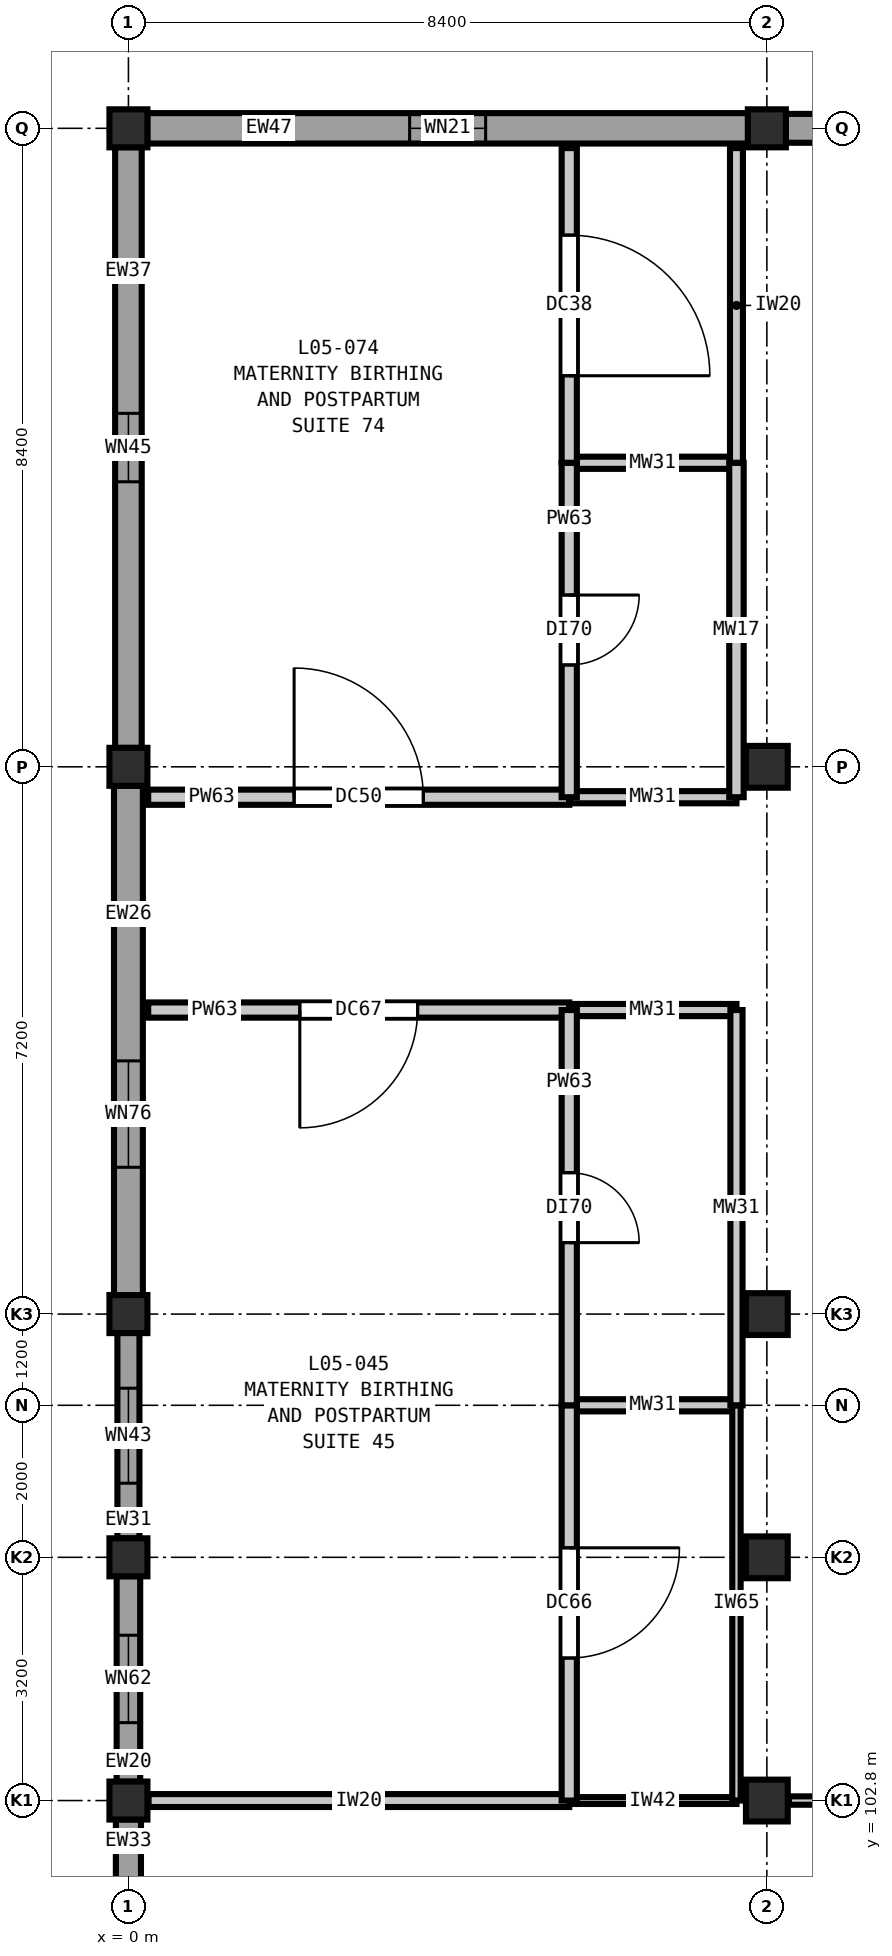
"""IFC4 building model, lengths in metres.
Left out: names, types, materials, properties, quantities, classifications, styles, units other than length and angle.
Written with IfcOpenShell. Run it as: python <this file> out.ifc"""

import sys

from ifc_helpers import new_model, si_unit, direction, frame, frame_2d, origin, origin_2d, place, context, subcontext, project, spatial, rectangle, extrude, element, fill, save


model = new_model("IFC4")
c1 = context("Model", 3, precision=1e-05, world=origin(), true_north=direction((0.0, 1.0)))
c2 = subcontext(c1, "Body", "Model", "MODEL_VIEW")
j1 = project(units=[si_unit("LENGTHUNIT", "METRE"), si_unit("PLANEANGLEUNIT", "RADIAN")], contexts=[c1])
p1 = place(None, origin())
s1 = spatial("IfcSite", under=j1, at=p1, CompositionType="ELEMENT")
p2 = place(p1, origin())
s2 = spatial("IfcBuilding", under=s1, at=p2, CompositionType="ELEMENT")
p3 = place(p2, frame((0.0, 0.0, 24.6)))
s3 = spatial("IfcBuildingStorey", under=s2, at=p3, CompositionType="ELEMENT", Elevation=24.6)
for number, where, z_axis, x_axis in (
    (1, (0.0, 102.8, 0.0), (0.0, 0.0, 1.0), (1.0, 0.0, 0.0)),
    (2, (0.0, 106.0, 0.0), (0.0, 0.0, 1.0), (1.0, 0.0, 0.0)),
    (3, (0.0, 109.2, 0.0), (0.0, 0.0, 1.0), (1.0, 0.0, 0.0)),
    (4, (0.0, 116.4, 0.0), (0.0, 0.0, 1.0), (1.0, 0.0, 0.0)),
    (5, (0.0, 124.8, 0.0), (0.0, 0.0, 1.0), (1.0, 0.0, 0.0)),
):
    element("IfcColumn", number, at=place(p3, frame(where, z_axis=z_axis, x_axis=x_axis)), inside=s3, PredefinedType="COLUMN", context=c2, shape_type="SweptSolid", body=[
        extrude(rectangle(XDim=0.5, YDim=0.5, at=origin_2d()), origin(), (0.0, 0.0, 1.0), 4.2),
    ])
for number, where, z_axis, x_axis in (
    (6, (8.4, 102.8, 0.0), (0.0, 0.0, 1.0), (1.0, 0.0, 0.0)),
    (7, (8.4, 106.0, 0.0), (0.0, 0.0, 1.0), (1.0, 0.0, 0.0)),
    (8, (8.4, 109.2, 0.0), (0.0, 0.0, 1.0), (1.0, 0.0, 0.0)),
    (9, (8.4, 116.4, 0.0), (0.0, 0.0, 1.0), (1.0, 0.0, 0.0)),
):
    element("IfcColumn", number, at=place(p3, frame(where, z_axis=z_axis, x_axis=x_axis)), inside=s3, PredefinedType="COLUMN", context=c2, shape_type="SweptSolid", body=[
        extrude(rectangle(XDim=0.55, YDim=0.55, at=origin_2d()), origin(), (0.0, 0.0, 1.0), 4.2),
    ])
p4 = place(p3, frame((8.4, 124.8, 0.0), z_axis=(0.0, 0.0, 1.0), x_axis=(1.0, 0.0, 0.0)))
e10 = element("IfcColumn", 10, at=p4, inside=s3, PredefinedType="COLUMN", context=c2, shape_type="SweptSolid", body=[
    extrude(rectangle(XDim=0.5, YDim=0.5, at=origin_2d()), origin(), (0.0, 0.0, 1.0), 4.2),
])
p5 = place(p3, frame((0.0, 99.848, 0.0), z_axis=(0.0, 0.0, 1.0), x_axis=(0.0, 1.0, 0.0)))
e11 = element("IfcWall", 11, at=p5, inside=s3, PredefinedType="SOLIDWALL", context=c2, shape_type="SweptSolid", body=[
    extrude(rectangle(XDim=2.704, YDim=0.33, at=frame_2d((1.352, 0.0))), origin(), (0.0, 0.0, 1.0), 3.48),
])
p6 = place(p5, frame((0.827, 0.0, 0.9)))
e12 = element("IfcOpeningElement", 12, at=p6, cuts=e11, PredefinedType="OPENING", context=c2, shape_type="SweptSolid", body=[
    extrude(rectangle(XDim=1.05, YDim=1.4, at=frame_2d((0.525, 0.7))), frame((0.0, 0.175, 0.0), z_axis=(0.0, -1.0, 0.0), x_axis=(1.0, 0.0, 0.0)), (0.0, 0.0, 1.0), 0.35),
])
p7 = place(p3, frame((0.0, 103.048, 0.0), z_axis=(0.0, 0.0, 1.0), x_axis=(0.0, 1.0, 0.0)))
e13 = element("IfcWall", 13, at=p7, inside=s3, PredefinedType="SOLIDWALL", context=c2, shape_type="SweptSolid", body=[
    extrude(rectangle(XDim=2.704, YDim=0.31, at=frame_2d((1.352, 0.0))), origin(), (0.0, 0.0, 1.0), 3.48),
])
p8 = place(p7, frame((0.777, 0.0, 0.9)))
e14 = element("IfcOpeningElement", 14, at=p8, cuts=e13, PredefinedType="OPENING", context=c2, shape_type="SweptSolid", body=[
    extrude(rectangle(XDim=1.15, YDim=1.4, at=frame_2d((0.575, 0.7))), frame((0.0, 0.165, 0.0), z_axis=(0.0, -1.0, 0.0), x_axis=(1.0, 0.0, 0.0)), (0.0, 0.0, 1.0), 0.33),
])
p9 = place(p3, frame((0.0, 106.248, 0.0), z_axis=(0.0, 0.0, 1.0), x_axis=(0.0, 1.0, 0.0)))
e15 = element("IfcWall", 15, at=p9, inside=s3, PredefinedType="SOLIDWALL", context=c2, shape_type="SweptSolid", body=[
    extrude(rectangle(XDim=2.704, YDim=0.29, at=frame_2d((1.352, 0.0))), origin(), (0.0, 0.0, 1.0), 3.48),
])
p10 = place(p9, frame((0.727, 0.0, 0.9)))
e16 = element("IfcOpeningElement", 16, at=p10, cuts=e15, PredefinedType="OPENING", context=c2, shape_type="SweptSolid", body=[
    extrude(rectangle(XDim=1.25, YDim=1.4, at=frame_2d((0.625, 0.7))), frame((0.0, 0.155, 0.0), z_axis=(0.0, -1.0, 0.0), x_axis=(1.0, 0.0, 0.0)), (0.0, 0.0, 1.0), 0.31),
])
p11 = place(p3, frame((0.0, 109.448, 0.0), z_axis=(0.0, 0.0, 1.0), x_axis=(0.0, 1.0, 0.0)))
e17 = element("IfcWall", 17, at=p11, inside=s3, PredefinedType="SOLIDWALL", context=c2, shape_type="SweptSolid", body=[
    extrude(rectangle(XDim=6.704, YDim=0.38, at=frame_2d((3.352, 0.0))), origin(), (0.0, 0.0, 1.0), 3.48),
])
p12 = place(p11, frame((1.683, 0.0, 0.9)))
e18 = element("IfcOpeningElement", 18, at=p12, cuts=e17, PredefinedType="OPENING", context=c2, shape_type="SweptSolid", body=[
    extrude(rectangle(XDim=1.4, YDim=1.4, at=frame_2d((0.7, 0.7))), frame((0.0, 0.2, 0.0), z_axis=(0.0, -1.0, 0.0), x_axis=(1.0, 0.0, 0.0)), (0.0, 0.0, 1.0), 0.4),
])
p13 = place(p3, frame((0.0, 116.648, 0.0), z_axis=(0.0, 0.0, 1.0), x_axis=(0.0, 1.0, 0.0)))
e19 = element("IfcWall", 19, at=p13, inside=s3, PredefinedType="SOLIDWALL", context=c2, shape_type="SweptSolid", body=[
    extrude(rectangle(XDim=7.904, YDim=0.35, at=frame_2d((3.952, 0.0))), origin(), (0.0, 0.0, 1.0), 3.48),
])
p14 = place(p13, frame((3.502, 0.0, 0.9)))
e20 = element("IfcOpeningElement", 20, at=p14, cuts=e19, PredefinedType="OPENING", context=c2, shape_type="SweptSolid", body=[
    extrude(rectangle(XDim=0.9, YDim=1.55, at=frame_2d((0.45, 0.775))), frame((0.0, 0.185, 0.0), z_axis=(0.0, -1.0, 0.0), x_axis=(1.0, 0.0, 0.0)), (0.0, 0.0, 1.0), 0.37),
])
p15 = place(p3, frame((0.248, 124.8, 0.0), z_axis=(0.0, 0.0, 1.0), x_axis=(1.0, 0.0, 0.0)))
e21 = element("IfcWall", 21, at=p15, inside=s3, PredefinedType="SOLIDWALL", context=c2, shape_type="SweptSolid", body=[
    extrude(rectangle(XDim=7.904, YDim=0.4, at=frame_2d((3.952, 0.0))), origin(), (0.0, 0.0, 1.0), 3.48),
])
p16 = place(p15, frame((3.452, 0.0, 0.9)))
e22 = element("IfcOpeningElement", 22, at=p16, cuts=e21, PredefinedType="OPENING", context=c2, shape_type="SweptSolid", body=[
    extrude(rectangle(XDim=1.0, YDim=1.55, at=frame_2d((0.5, 0.775))), frame((0.0, 0.21, 0.0), z_axis=(0.0, -1.0, 0.0), x_axis=(1.0, 0.0, 0.0)), (0.0, 0.0, 1.0), 0.42),
])
p17 = place(p3, frame((8.648, 124.8, 0.0), z_axis=(0.0, 0.0, 1.0), x_axis=(1.0, 0.0, 0.0)))
e23 = element("IfcWall", 23, at=p17, inside=s3, PredefinedType="SOLIDWALL", context=c2, shape_type="SweptSolid", body=[
    extrude(rectangle(XDim=7.904, YDim=0.38, at=frame_2d((3.952, 0.0))), origin(), (0.0, 0.0, 1.0), 3.48),
])
p18 = place(p17, frame((3.402, 0.0, 0.9)))
e24 = element("IfcOpeningElement", 24, at=p18, cuts=e23, PredefinedType="OPENING", context=c2, shape_type="SweptSolid", body=[
    extrude(rectangle(XDim=1.1, YDim=1.55, at=frame_2d((0.55, 0.775))), frame((0.0, 0.2, 0.0), z_axis=(0.0, -1.0, 0.0), x_axis=(1.0, 0.0, 0.0)), (0.0, 0.0, 1.0), 0.4),
])
p19 = place(p3, frame((0.265, 102.8, 0.0), z_axis=(0.0, 0.0, 1.0), x_axis=(1.0, 0.0, 0.0)))
e25 = element("IfcWall", 25, at=p19, inside=s3, PredefinedType="PARTITIONING", context=c2, shape_type="SweptSolid", body=[
    extrude(rectangle(XDim=5.535, YDim=0.17, at=frame_2d((2.768, 0.0))), origin(), (0.0, 0.0, 1.0), 3.585),
])
p20 = place(p3, frame((5.8, 102.8, 0.0), z_axis=(0.0, 0.0, 1.0), x_axis=(1.0, 0.0, 0.0)))
e26 = element("IfcWall", 26, at=p20, inside=s3, PredefinedType="PARTITIONING", context=c2, shape_type="SweptSolid", body=[
    extrude(rectangle(XDim=2.2, YDim=0.09, at=frame_2d((1.1, 0.0))), origin(), (0.0, 0.0, 1.0), 3.585),
])
p21 = place(p3, frame((8.69, 102.8, 0.0), z_axis=(0.0, 0.0, 1.0), x_axis=(1.0, 0.0, 0.0)))
e27 = element("IfcWall", 27, at=p21, inside=s3, PredefinedType="PARTITIONING", context=c2, shape_type="SweptSolid", body=[
    extrude(rectangle(XDim=4.51, YDim=0.11, at=frame_2d((2.255, 0.0))), origin(), (0.0, 0.0, 1.0), 3.585),
])
p22 = place(p3, frame((5.8, 108.0, 0.0), z_axis=(0.0, 0.0, 1.0), x_axis=(1.0, 0.0, 0.0)))
e28 = element("IfcWall", 28, at=p22, inside=s3, PredefinedType="PLUMBINGWALL", context=c2, shape_type="SweptSolid", body=[
    extrude(rectangle(XDim=2.2, YDim=0.16, at=frame_2d((1.1, 0.0))), origin(), (0.0, 0.0, 1.0), 3.92),
])
p23 = place(p3, frame((0.26, 113.2, 0.0), z_axis=(0.0, 0.0, 1.0), x_axis=(1.0, 0.0, 0.0)))
e29 = element("IfcWall", 29, at=p23, inside=s3, PredefinedType="PARTITIONING", context=c2, shape_type="SweptSolid", body=[
    extrude(rectangle(XDim=5.54, YDim=0.2, at=frame_2d((2.77, 0.0))), origin(), (0.0, 0.0, 1.0), 3.92),
])
p24 = place(p23, frame((1.995, 0.0, 0.0)))
e30 = element("IfcOpeningElement", 30, at=p24, cuts=e29, PredefinedType="OPENING", context=c2, shape_type="SweptSolid", body=[
    extrude(rectangle(XDim=1.55, YDim=2.25, at=frame_2d((0.775, 1.125))), frame((0.0, 0.11, 0.0), z_axis=(0.0, -1.0, 0.0), x_axis=(1.0, 0.0, 0.0)), (0.0, 0.0, 1.0), 0.22),
])
p25 = place(p3, frame((5.8, 113.2, 0.0), z_axis=(0.0, 0.0, 1.0), x_axis=(1.0, 0.0, 0.0)))
e31 = element("IfcWall", 31, at=p25, inside=s3, PredefinedType="PLUMBINGWALL", context=c2, shape_type="SweptSolid", body=[
    extrude(rectangle(XDim=2.2, YDim=0.16, at=frame_2d((1.1, 0.0))), origin(), (0.0, 0.0, 1.0), 3.92),
])
p26 = place(p3, frame((0.26, 116.0, 0.0), z_axis=(0.0, 0.0, 1.0), x_axis=(1.0, 0.0, 0.0)))
e32 = element("IfcWall", 32, at=p26, inside=s3, PredefinedType="PARTITIONING", context=c2, shape_type="SweptSolid", body=[
    extrude(rectangle(XDim=5.54, YDim=0.2, at=frame_2d((2.77, 0.0))), origin(), (0.0, 0.0, 1.0), 3.92),
])
p27 = place(p26, frame((1.92, 0.0, 0.0)))
e33 = element("IfcOpeningElement", 33, at=p27, cuts=e32, PredefinedType="OPENING", context=c2, shape_type="SweptSolid", body=[
    extrude(rectangle(XDim=1.7, YDim=2.3, at=frame_2d((0.85, 1.15))), frame((0.0, 0.11, 0.0), z_axis=(0.0, -1.0, 0.0), x_axis=(1.0, 0.0, 0.0)), (0.0, 0.0, 1.0), 0.22),
])
for number, where, z_axis, x_axis in (
    (34, (5.8, 116.0, 0.0), (0.0, 0.0, 1.0), (1.0, 0.0, 0.0)),
    (35, (5.8, 120.4, 0.0), (0.0, 0.0, 1.0), (1.0, 0.0, 0.0)),
):
    element("IfcWall", number, at=place(p3, frame(where, z_axis=z_axis, x_axis=x_axis)), inside=s3, PredefinedType="PLUMBINGWALL", context=c2, shape_type="SweptSolid", body=[
        extrude(rectangle(XDim=2.2, YDim=0.16, at=frame_2d((1.1, 0.0))), origin(), (0.0, 0.0, 1.0), 3.92),
    ])
p28 = place(p3, frame((5.8, 102.8, 0.0), z_axis=(0.0, 0.0, 1.0), x_axis=(0.0, 1.0, 0.0)))
e36 = element("IfcWall", 36, at=p28, inside=s3, PredefinedType="PARTITIONING", context=c2, shape_type="SweptSolid", body=[
    extrude(rectangle(XDim=5.2, YDim=0.2, at=frame_2d((2.6, 0.0))), origin(), (0.0, 0.0, 1.0), 3.92),
])
p29 = place(p28, frame((1.875, 0.0, 0.0)))
e37 = element("IfcOpeningElement", 37, at=p29, cuts=e36, PredefinedType="OPENING", context=c2, shape_type="SweptSolid", body=[
    extrude(rectangle(XDim=1.45, YDim=2.25, at=frame_2d((0.725, 1.125))), frame((0.0, 0.11, 0.0), z_axis=(0.0, -1.0, 0.0), x_axis=(1.0, 0.0, 0.0)), (0.0, 0.0, 1.0), 0.22),
])
p30 = place(p3, frame((5.8, 108.0, 0.0), z_axis=(0.0, 0.0, 1.0), x_axis=(0.0, 1.0, 0.0)))
e38 = element("IfcWall", 38, at=p30, inside=s3, PredefinedType="PARTITIONING", context=c2, shape_type="SweptSolid", body=[
    extrude(rectangle(XDim=5.2, YDim=0.2, at=frame_2d((2.6, 0.0))), origin(), (0.0, 0.0, 1.0), 3.92),
])
p31 = place(p30, frame((2.14, 0.0, 0.0)))
e39 = element("IfcOpeningElement", 39, at=p31, cuts=e38, PredefinedType="OPENING", context=c2, shape_type="SweptSolid", body=[
    extrude(rectangle(XDim=0.92, YDim=2.1, at=frame_2d((0.46, 1.05))), frame((0.0, 0.11, 0.0), z_axis=(0.0, -1.0, 0.0), x_axis=(1.0, 0.0, 0.0)), (0.0, 0.0, 1.0), 0.22),
])
p32 = place(p3, frame((5.8, 116.0, 0.0), z_axis=(0.0, 0.0, 1.0), x_axis=(0.0, 1.0, 0.0)))
e40 = element("IfcWall", 40, at=p32, inside=s3, PredefinedType="PARTITIONING", context=c2, shape_type="SweptSolid", body=[
    extrude(rectangle(XDim=4.4, YDim=0.2, at=frame_2d((2.2, 0.0))), origin(), (0.0, 0.0, 1.0), 3.92),
])
p33 = place(p32, frame((1.74, 0.0, 0.0)))
e41 = element("IfcOpeningElement", 41, at=p33, cuts=e40, PredefinedType="OPENING", context=c2, shape_type="SweptSolid", body=[
    extrude(rectangle(XDim=0.92, YDim=2.1, at=frame_2d((0.46, 1.05))), frame((0.0, 0.11, 0.0), z_axis=(0.0, -1.0, 0.0), x_axis=(1.0, 0.0, 0.0)), (0.0, 0.0, 1.0), 0.22),
])
p34 = place(p3, frame((5.8, 120.4, 0.0), z_axis=(0.0, 0.0, 1.0), x_axis=(0.0, 1.0, 0.0)))
e42 = element("IfcWall", 42, at=p34, inside=s3, PredefinedType="PARTITIONING", context=c2, shape_type="SweptSolid", body=[
    extrude(rectangle(XDim=4.14, YDim=0.2, at=frame_2d((2.07, 0.0))), origin(), (0.0, 0.0, 1.0), 3.92),
])
p35 = place(p34, frame((1.145, 0.0, 0.0)))
e43 = element("IfcOpeningElement", 43, at=p35, cuts=e42, PredefinedType="OPENING", context=c2, shape_type="SweptSolid", body=[
    extrude(rectangle(XDim=1.85, YDim=2.3, at=frame_2d((0.925, 1.15))), frame((0.0, 0.11, 0.0), z_axis=(0.0, -1.0, 0.0), x_axis=(1.0, 0.0, 0.0)), (0.0, 0.0, 1.0), 0.22),
])
p36 = place(p3, frame((8.0, 102.8, 0.0), z_axis=(0.0, 0.0, 1.0), x_axis=(0.0, 1.0, 0.0)))
e44 = element("IfcWall", 44, at=p36, inside=s3, PredefinedType="PARTITIONING", context=c2, shape_type="SweptSolid", body=[
    extrude(rectangle(XDim=5.2, YDim=0.11, at=frame_2d((2.6, 0.0))), origin(), (0.0, 0.0, 1.0), 3.92),
])
p37 = place(p3, frame((8.0, 108.0, 0.0), z_axis=(0.0, 0.0, 1.0), x_axis=(0.0, 1.0, 0.0)))
e45 = element("IfcWall", 45, at=p37, inside=s3, PredefinedType="PLUMBINGWALL", context=c2, shape_type="SweptSolid", body=[
    extrude(rectangle(XDim=5.2, YDim=0.16, at=frame_2d((2.6, 0.0))), origin(), (0.0, 0.0, 1.0), 3.92),
])
p38 = place(p3, frame((8.0, 116.0, 0.0), z_axis=(0.0, 0.0, 1.0), x_axis=(0.0, 1.0, 0.0)))
e46 = element("IfcWall", 46, at=p38, inside=s3, PredefinedType="PLUMBINGWALL", context=c2, shape_type="SweptSolid", body=[
    extrude(rectangle(XDim=4.4, YDim=0.19, at=frame_2d((2.2, 0.0))), origin(), (0.0, 0.0, 1.0), 3.92),
])
p39 = place(p3, frame((8.0, 120.4, 0.0), z_axis=(0.0, 0.0, 1.0), x_axis=(0.0, 1.0, 0.0)))
e47 = element("IfcWall", 47, at=p39, inside=s3, PredefinedType="PARTITIONING", context=c2, shape_type="SweptSolid", body=[
    extrude(rectangle(XDim=4.14, YDim=0.17, at=frame_2d((2.07, 0.0))), origin(), (0.0, 0.0, 1.0), 3.92),
])
p40 = place(p8, origin())
e48 = element("IfcWindow", 48, at=p40, inside=s3, PartitioningType="SINGLE_PANEL", PredefinedType="WINDOW", context=c2, shape_type="SweptSolid", body=[
    extrude(rectangle(XDim=1.15, YDim=1.4, at=frame_2d((0.575, 0.7))), frame((0.0, 0.03, 0.0), z_axis=(0.0, -1.0, 0.0), x_axis=(1.0, 0.0, 0.0)), (0.0, 0.0, 1.0), 0.06),
])
fill(e14, e48)
p41 = place(p10, origin())
e49 = element("IfcWindow", 49, at=p41, inside=s3, PartitioningType="SINGLE_PANEL", PredefinedType="WINDOW", context=c2, shape_type="SweptSolid", body=[
    extrude(rectangle(XDim=1.25, YDim=1.4, at=frame_2d((0.625, 0.7))), frame((0.0, 0.03, 0.0), z_axis=(0.0, -1.0, 0.0), x_axis=(1.0, 0.0, 0.0)), (0.0, 0.0, 1.0), 0.06),
])
fill(e16, e49)
p42 = place(p12, origin())
e50 = element("IfcWindow", 50, at=p42, inside=s3, PartitioningType="SINGLE_PANEL", PredefinedType="WINDOW", context=c2, shape_type="SweptSolid", body=[
    extrude(rectangle(XDim=1.4, YDim=1.4, at=frame_2d((0.7, 0.7))), frame((0.0, 0.03, 0.0), z_axis=(0.0, -1.0, 0.0), x_axis=(1.0, 0.0, 0.0)), (0.0, 0.0, 1.0), 0.06),
])
fill(e18, e50)
p43 = place(p14, origin())
e51 = element("IfcWindow", 51, at=p43, inside=s3, PartitioningType="SINGLE_PANEL", PredefinedType="WINDOW", context=c2, shape_type="SweptSolid", body=[
    extrude(rectangle(XDim=0.9, YDim=1.55, at=frame_2d((0.45, 0.775))), frame((0.0, 0.03, 0.0), z_axis=(0.0, -1.0, 0.0), x_axis=(1.0, 0.0, 0.0)), (0.0, 0.0, 1.0), 0.06),
])
fill(e20, e51)
p44 = place(p16, origin())
e52 = element("IfcWindow", 52, at=p44, inside=s3, PartitioningType="SINGLE_PANEL", PredefinedType="WINDOW", context=c2, shape_type="SweptSolid", body=[
    extrude(rectangle(XDim=1.0, YDim=1.55, at=frame_2d((0.5, 0.775))), frame((0.0, 0.03, 0.0), z_axis=(0.0, -1.0, 0.0), x_axis=(1.0, 0.0, 0.0)), (0.0, 0.0, 1.0), 0.06),
])
fill(e22, e52)
p45 = place(p24, frame((1.55, 0.0, 0.0), z_axis=(0.0, 0.0, 1.0), x_axis=(-1.0, 0.0, 0.0)))
e53 = element("IfcDoor", 53, at=p45, inside=s3, OperationType="SINGLE_SWING_RIGHT", PredefinedType="DOOR", context=c2, shape_type="SweptSolid", body=[
    extrude(rectangle(XDim=1.55, YDim=2.25, at=frame_2d((0.775, 1.125))), frame((0.0, 0.025, 0.0), z_axis=(0.0, -1.0, 0.0), x_axis=(1.0, 0.0, 0.0)), (0.0, 0.0, 1.0), 0.05),
])
fill(e30, e53)
p46 = place(p27, origin())
e54 = element("IfcDoor", 54, at=p46, inside=s3, OperationType="SINGLE_SWING_LEFT", PredefinedType="DOOR", context=c2, shape_type="SweptSolid", body=[
    extrude(rectangle(XDim=1.7, YDim=2.3, at=frame_2d((0.85, 1.15))), frame((0.0, 0.025, 0.0), z_axis=(0.0, -1.0, 0.0), x_axis=(1.0, 0.0, 0.0)), (0.0, 0.0, 1.0), 0.05),
])
fill(e33, e54)
p47 = place(p29, frame((1.45, 0.0, 0.0), z_axis=(0.0, 0.0, 1.0), x_axis=(-1.0, 0.0, 0.0)))
e55 = element("IfcDoor", 55, at=p47, inside=s3, OperationType="SINGLE_SWING_LEFT", PredefinedType="DOOR", context=c2, shape_type="SweptSolid", body=[
    extrude(rectangle(XDim=1.45, YDim=2.25, at=frame_2d((0.725, 1.125))), frame((0.0, 0.025, 0.0), z_axis=(0.0, -1.0, 0.0), x_axis=(1.0, 0.0, 0.0)), (0.0, 0.0, 1.0), 0.05),
])
fill(e37, e55)
p48 = place(p31, frame((0.92, 0.0, 0.0), z_axis=(0.0, 0.0, 1.0), x_axis=(-1.0, 0.0, 0.0)))
e56 = element("IfcDoor", 56, at=p48, inside=s3, OperationType="SINGLE_SWING_RIGHT", PredefinedType="DOOR", context=c2, shape_type="SweptSolid", body=[
    extrude(rectangle(XDim=0.92, YDim=2.1, at=frame_2d((0.46, 1.05))), frame((0.0, 0.025, 0.0), z_axis=(0.0, -1.0, 0.0), x_axis=(1.0, 0.0, 0.0)), (0.0, 0.0, 1.0), 0.05),
])
fill(e39, e56)
p49 = place(p33, frame((0.92, 0.0, 0.0), z_axis=(0.0, 0.0, 1.0), x_axis=(-1.0, 0.0, 0.0)))
e57 = element("IfcDoor", 57, at=p49, inside=s3, OperationType="SINGLE_SWING_LEFT", PredefinedType="DOOR", context=c2, shape_type="SweptSolid", body=[
    extrude(rectangle(XDim=0.92, YDim=2.1, at=frame_2d((0.46, 1.05))), frame((0.0, 0.025, 0.0), z_axis=(0.0, -1.0, 0.0), x_axis=(1.0, 0.0, 0.0)), (0.0, 0.0, 1.0), 0.05),
])
fill(e41, e57)
p50 = place(p35, frame((1.85, 0.0, 0.0), z_axis=(0.0, 0.0, 1.0), x_axis=(-1.0, 0.0, 0.0)))
e58 = element("IfcDoor", 58, at=p50, inside=s3, OperationType="SINGLE_SWING_RIGHT", PredefinedType="DOOR", context=c2, shape_type="SweptSolid", body=[
    extrude(rectangle(XDim=1.85, YDim=2.3, at=frame_2d((0.925, 1.15))), frame((0.0, 0.025, 0.0), z_axis=(0.0, -1.0, 0.0), x_axis=(1.0, 0.0, 0.0)), (0.0, 0.0, 1.0), 0.05),
])
fill(e43, e58)
save(model, sys.argv[1])
